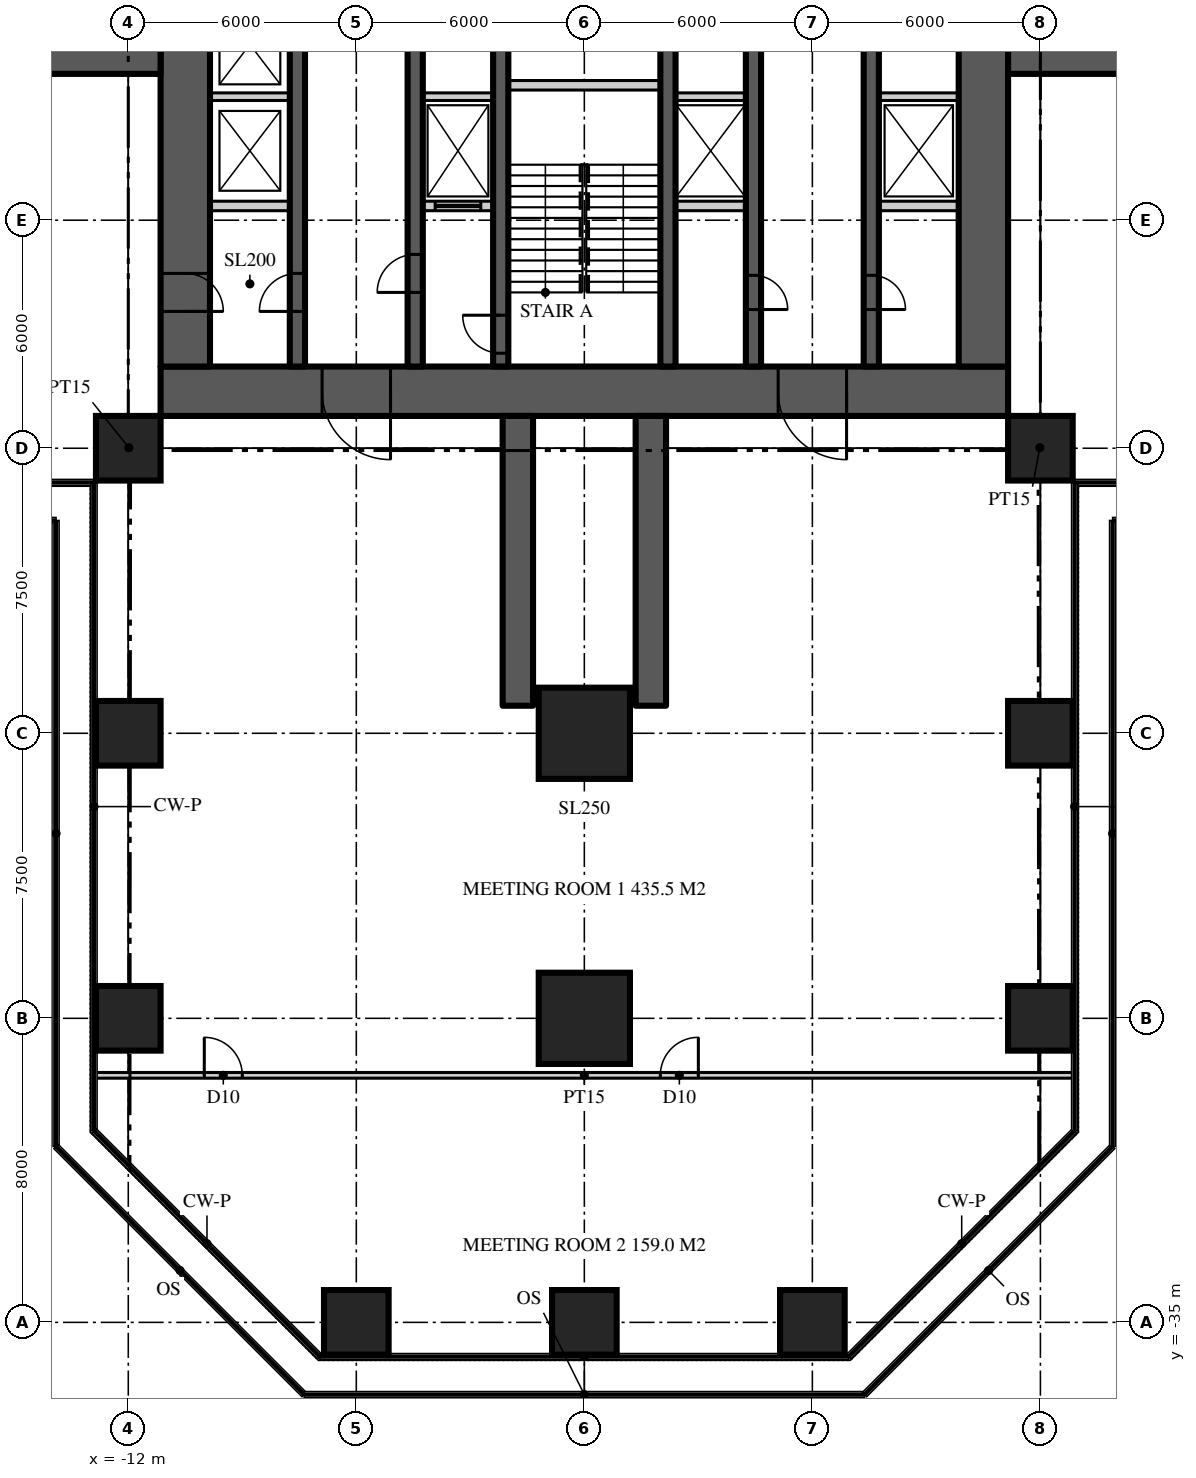
"""IFC4 building model, lengths in metres.
Left out: names, types, materials, properties, quantities, classifications, styles, units other than length and angle.
Written with IfcOpenShell. Run it as: python <this file> out.ifc"""

import sys

from ifc_helpers import new_model, si_unit, direction, frame, frame_2d, origin, origin_2d, place, context, subcontext, project, spatial, rectangle, extrude, element, fill, save


model = new_model("IFC4")
c1 = context("Model", 3, precision=1e-05, world=origin(), true_north=direction((0.0, 1.0)))
c2 = subcontext(c1, "Body", "Model", "MODEL_VIEW")
j1 = project(units=[si_unit("LENGTHUNIT", "METRE"), si_unit("PLANEANGLEUNIT", "RADIAN")], contexts=[c1])
p1 = place(None, origin())
s1 = spatial("IfcSite", under=j1, at=p1, CompositionType="ELEMENT")
p2 = place(p1, origin())
s2 = spatial("IfcBuilding", under=s1, at=p2, CompositionType="ELEMENT")
p3 = place(p2, frame((0.0, 0.0, 33.0)))
s3 = spatial("IfcBuildingStorey", under=s2, at=p3, CompositionType="ELEMENT", Elevation=33.0)
p4 = place(p3, frame((11.15, -10.5, 0.0), z_axis=(0.0, 0.0, 1.0), x_axis=(-1.0, 0.0, 0.0)))
e1 = element("IfcWall", 1, at=p4, inside=s3, PredefinedType="SHEAR", context=c2, shape_type="SweptSolid", body=[
    extrude(rectangle(XDim=22.3, YDim=1.3, at=frame_2d((11.15, 0.0))), origin(), (0.0, 0.0, 1.0), 4.5),
])
p5 = place(p4, frame((16.25, 0.0, 0.0)))
e2 = element("IfcOpeningElement", 2, at=p5, cuts=e1, PredefinedType="OPENING", context=c2, shape_type="SweptSolid", body=[
    extrude(rectangle(XDim=1.8, YDim=2.2, at=frame_2d((0.9, 1.1))), frame((0.0, 0.66, 0.0), z_axis=(0.0, -1.0, 0.0), x_axis=(1.0, 0.0, 0.0)), (0.0, 0.0, 1.0), 1.32),
])
p6 = place(p4, frame((4.25, 0.0, 0.0)))
e3 = element("IfcOpeningElement", 3, at=p6, cuts=e1, PredefinedType="OPENING", context=c2, shape_type="SweptSolid", body=[
    extrude(rectangle(XDim=1.8, YDim=2.2, at=frame_2d((0.9, 1.1))), frame((0.0, 0.66, 0.0), z_axis=(0.0, -1.0, 0.0), x_axis=(1.0, 0.0, 0.0)), (0.0, 0.0, 1.0), 1.32),
])
p7 = place(p3, frame((10.5, -9.85, 0.0), z_axis=(0.0, 0.0, 1.0), x_axis=(0.0, 1.0, 0.0)))
e4 = element("IfcWall", 4, at=p7, inside=s3, PredefinedType="SHEAR", context=c2, shape_type="SweptSolid", body=[
    extrude(rectangle(XDim=19.7, YDim=1.3, at=frame_2d((9.85, 0.0))), origin(), (0.0, 0.0, 1.0), 4.5),
])
p8 = place(p7, frame((17.25, 0.0, 0.0)))
e5 = element("IfcOpeningElement", 5, at=p8, cuts=e4, PredefinedType="OPENING", context=c2, shape_type="SweptSolid", body=[
    extrude(rectangle(XDim=1.0, YDim=2.2, at=frame_2d((0.5, 1.1))), frame((0.0, 0.66, 0.0), z_axis=(0.0, -1.0, 0.0), x_axis=(1.0, 0.0, 0.0)), (0.0, 0.0, 1.0), 1.32),
])
p9 = place(p3, frame((-10.5, 9.85, 0.0), z_axis=(0.0, 0.0, 1.0), x_axis=(0.0, -1.0, 0.0)))
e6 = element("IfcWall", 6, at=p9, inside=s3, PredefinedType="SHEAR", context=c2, shape_type="SweptSolid", body=[
    extrude(rectangle(XDim=19.7, YDim=1.3, at=frame_2d((9.85, 0.0))), origin(), (0.0, 0.0, 1.0), 4.5),
])
p10 = place(p9, frame((17.25, 0.0, 0.0)))
e7 = element("IfcOpeningElement", 7, at=p10, cuts=e6, PredefinedType="OPENING", context=c2, shape_type="SweptSolid", body=[
    extrude(rectangle(XDim=1.0, YDim=2.2, at=frame_2d((0.5, 1.1))), frame((0.0, 0.66, 0.0), z_axis=(0.0, -1.0, 0.0), x_axis=(1.0, 0.0, 0.0)), (0.0, 0.0, 1.0), 1.32),
])
for number, where, z_axis, x_axis in (
    (8, (11.15, -1.75, 0.0), (0.0, 0.0, 1.0), (1.0, 0.0, 0.0)),
    (9, (-11.15, -1.75, 0.0), (0.0, 0.0, 1.0), (-1.0, 0.0, 0.0)),
    (10, (-1.75, -11.15, 0.0), (0.0, 0.0, 1.0), (0.0, -1.0, 0.0)),
    (11, (1.75, -11.15, 0.0), (0.0, 0.0, 1.0), (0.0, -1.0, 0.0)),
):
    element("IfcWall", number, at=place(p3, frame(where, z_axis=z_axis, x_axis=x_axis)), inside=s3, PredefinedType="SHEAR", context=c2, shape_type="SweptSolid", body=[
        extrude(rectangle(XDim=7.625, YDim=0.8, at=frame_2d((3.812, 0.0))), origin(), (0.0, 0.0, 1.0), 4.5),
    ])
for number, where, z_axis, x_axis in (
    (12, (-6.0, -35.0, 0.0), (0.0, 0.0, 1.0), (1.0, 0.0, 0.0)),
    (13, (0.0, -35.0, 0.0), (0.0, 0.0, 1.0), (1.0, 0.0, 0.0)),
    (14, (6.0, -35.0, 0.0), (0.0, 0.0, 1.0), (1.0, 0.0, 0.0)),
    (15, (-12.0, -27.0, 0.0), (0.0, 0.0, 1.0), (1.0, 0.0, 0.0)),
):
    element("IfcColumn", number, at=place(p3, frame(where, z_axis=z_axis, x_axis=x_axis)), inside=s3, PredefinedType="COLUMN", context=c2, shape_type="SweptSolid", body=[
        extrude(rectangle(XDim=1.7, YDim=1.7, at=origin_2d()), origin(), (0.0, 0.0, 1.0), 4.5),
    ])
p11 = place(p3, frame((0.0, -27.0, 0.0), z_axis=(0.0, 0.0, 1.0), x_axis=(1.0, 0.0, 0.0)))
e16 = element("IfcColumn", 16, at=p11, inside=s3, PredefinedType="COLUMN", context=c2, shape_type="SweptSolid", body=[
    extrude(rectangle(XDim=2.4, YDim=2.4, at=origin_2d()), origin(), (0.0, 0.0, 1.0), 4.5),
])
for number, where, z_axis, x_axis in (
    (17, (12.0, -27.0, 0.0), (0.0, 0.0, 1.0), (1.0, 0.0, 0.0)),
    (18, (-12.0, -19.5, 0.0), (0.0, 0.0, 1.0), (1.0, 0.0, 0.0)),
):
    element("IfcColumn", number, at=place(p3, frame(where, z_axis=z_axis, x_axis=x_axis)), inside=s3, PredefinedType="COLUMN", context=c2, shape_type="SweptSolid", body=[
        extrude(rectangle(XDim=1.7, YDim=1.7, at=origin_2d()), origin(), (0.0, 0.0, 1.0), 4.5),
    ])
p12 = place(p3, frame((0.0, -19.5, 0.0), z_axis=(0.0, 0.0, 1.0), x_axis=(1.0, 0.0, 0.0)))
e19 = element("IfcColumn", 19, at=p12, inside=s3, PredefinedType="COLUMN", context=c2, shape_type="SweptSolid", body=[
    extrude(rectangle(XDim=2.4, YDim=2.4, at=origin_2d()), origin(), (0.0, 0.0, 1.0), 4.5),
])
for number, where, z_axis, x_axis in (
    (20, (12.0, -19.5, 0.0), (0.0, 0.0, 1.0), (1.0, 0.0, 0.0)),
    (21, (-12.0, -12.0, 0.0), (0.0, 0.0, 1.0), (1.0, 0.0, 0.0)),
    (22, (12.0, -12.0, 0.0), (0.0, 0.0, 1.0), (1.0, 0.0, 0.0)),
):
    element("IfcColumn", number, at=place(p3, frame(where, z_axis=z_axis, x_axis=x_axis)), inside=s3, PredefinedType="COLUMN", context=c2, shape_type="SweptSolid", body=[
        extrude(rectangle(XDim=1.7, YDim=1.7, at=origin_2d()), origin(), (0.0, 0.0, 1.0), 4.5),
    ])
p13 = place(p3, frame((-7.55, -9.85, 0.0), z_axis=(0.0, 0.0, 1.0), x_axis=(0.0, 1.0, 0.0)))
e23 = element("IfcWall", 23, at=p13, inside=s3, PredefinedType="SHEAR", context=c2, shape_type="SweptSolid", body=[
    extrude(rectangle(XDim=19.7, YDim=0.4, at=frame_2d((9.85, 0.0))), origin(), (0.0, 0.0, 1.0), 4.5),
])
p14 = place(p13, frame((1.45, 0.0, 0.0)))
e24 = element("IfcOpeningElement", 24, at=p14, cuts=e23, PredefinedType="OPENING", context=c2, shape_type="SweptSolid", body=[
    extrude(rectangle(XDim=1.0, YDim=2.2, at=frame_2d((0.5, 1.1))), frame((0.0, 0.21, 0.0), z_axis=(0.0, -1.0, 0.0), x_axis=(1.0, 0.0, 0.0)), (0.0, 0.0, 1.0), 0.42),
])
p15 = place(p13, frame((17.3, 0.0, 0.0)))
e25 = element("IfcOpeningElement", 25, at=p15, cuts=e23, PredefinedType="OPENING", context=c2, shape_type="SweptSolid", body=[
    extrude(rectangle(XDim=0.9, YDim=2.1, at=frame_2d((0.45, 1.05))), frame((0.0, 0.21, 0.0), z_axis=(0.0, -1.0, 0.0), x_axis=(1.0, 0.0, 0.0)), (0.0, 0.0, 1.0), 0.42),
])
p16 = place(p3, frame((7.55, 9.85, 0.0), z_axis=(0.0, 0.0, 1.0), x_axis=(0.0, -1.0, 0.0)))
e26 = element("IfcWall", 26, at=p16, inside=s3, PredefinedType="SHEAR", context=c2, shape_type="SweptSolid", body=[
    extrude(rectangle(XDim=19.7, YDim=0.4, at=frame_2d((9.85, 0.0))), origin(), (0.0, 0.0, 1.0), 4.5),
])
p17 = place(p16, frame((1.45, 0.0, 0.0)))
e27 = element("IfcOpeningElement", 27, at=p17, cuts=e26, PredefinedType="OPENING", context=c2, shape_type="SweptSolid", body=[
    extrude(rectangle(XDim=1.0, YDim=2.2, at=frame_2d((0.5, 1.1))), frame((0.0, 0.21, 0.0), z_axis=(0.0, -1.0, 0.0), x_axis=(1.0, 0.0, 0.0)), (0.0, 0.0, 1.0), 0.42),
])
p18 = place(p16, frame((17.3, 0.0, 0.0)))
e28 = element("IfcOpeningElement", 28, at=p18, cuts=e26, PredefinedType="OPENING", context=c2, shape_type="SweptSolid", body=[
    extrude(rectangle(XDim=0.9, YDim=2.1, at=frame_2d((0.45, 1.05))), frame((0.0, 0.21, 0.0), z_axis=(0.0, -1.0, 0.0), x_axis=(1.0, 0.0, 0.0)), (0.0, 0.0, 1.0), 0.42),
])
p19 = place(p3, frame((-4.45, -9.85, 0.0), z_axis=(0.0, 0.0, 1.0), x_axis=(0.0, 1.0, 0.0)))
e29 = element("IfcWall", 29, at=p19, inside=s3, PredefinedType="SHEAR", context=c2, shape_type="SweptSolid", body=[
    extrude(rectangle(XDim=19.7, YDim=0.4, at=frame_2d((9.85, 0.0))), origin(), (0.0, 0.0, 1.0), 4.5),
])
p20 = place(p19, frame((1.95, 0.0, 0.0)))
e30 = element("IfcOpeningElement", 30, at=p20, cuts=e29, PredefinedType="OPENING", context=c2, shape_type="SweptSolid", body=[
    extrude(rectangle(XDim=1.0, YDim=2.2, at=frame_2d((0.5, 1.1))), frame((0.0, 0.21, 0.0), z_axis=(0.0, -1.0, 0.0), x_axis=(1.0, 0.0, 0.0)), (0.0, 0.0, 1.0), 0.42),
])
p21 = place(p19, frame((17.25, 0.0, 0.0)))
e31 = element("IfcOpeningElement", 31, at=p21, cuts=e29, PredefinedType="OPENING", context=c2, shape_type="SweptSolid", body=[
    extrude(rectangle(XDim=1.0, YDim=2.1, at=frame_2d((0.5, 1.05))), frame((0.0, 0.21, 0.0), z_axis=(0.0, -1.0, 0.0), x_axis=(1.0, 0.0, 0.0)), (0.0, 0.0, 1.0), 0.42),
])
p22 = place(p3, frame((4.45, 9.85, 0.0), z_axis=(0.0, 0.0, 1.0), x_axis=(0.0, -1.0, 0.0)))
e32 = element("IfcWall", 32, at=p22, inside=s3, PredefinedType="SHEAR", context=c2, shape_type="SweptSolid", body=[
    extrude(rectangle(XDim=19.7, YDim=0.4, at=frame_2d((9.85, 0.0))), origin(), (0.0, 0.0, 1.0), 4.5),
])
p23 = place(p22, frame((1.95, 0.0, 0.0)))
e33 = element("IfcOpeningElement", 33, at=p23, cuts=e32, PredefinedType="OPENING", context=c2, shape_type="SweptSolid", body=[
    extrude(rectangle(XDim=1.0, YDim=2.2, at=frame_2d((0.5, 1.1))), frame((0.0, 0.21, 0.0), z_axis=(0.0, -1.0, 0.0), x_axis=(1.0, 0.0, 0.0)), (0.0, 0.0, 1.0), 0.42),
])
p24 = place(p22, frame((17.3, 0.0, 0.0)))
e34 = element("IfcOpeningElement", 34, at=p24, cuts=e32, PredefinedType="OPENING", context=c2, shape_type="SweptSolid", body=[
    extrude(rectangle(XDim=0.9, YDim=2.1, at=frame_2d((0.45, 1.05))), frame((0.0, 0.21, 0.0), z_axis=(0.0, -1.0, 0.0), x_axis=(1.0, 0.0, 0.0)), (0.0, 0.0, 1.0), 0.42),
])
p25 = place(p3, frame((-2.2, -9.85, 0.0), z_axis=(0.0, 0.0, 1.0), x_axis=(0.0, 1.0, 0.0)))
e35 = element("IfcWall", 35, at=p25, inside=s3, PredefinedType="SHEAR", context=c2, shape_type="SweptSolid", body=[
    extrude(rectangle(XDim=19.7, YDim=0.4, at=frame_2d((9.85, 0.0))), origin(), (0.0, 0.0, 1.0), 4.5),
])
p26 = place(p25, frame((0.35, 0.0, 0.0)))
e36 = element("IfcOpeningElement", 36, at=p26, cuts=e35, PredefinedType="OPENING", context=c2, shape_type="SweptSolid", body=[
    extrude(rectangle(XDim=1.0, YDim=2.2, at=frame_2d((0.5, 1.1))), frame((0.0, 0.21, 0.0), z_axis=(0.0, -1.0, 0.0), x_axis=(1.0, 0.0, 0.0)), (0.0, 0.0, 1.0), 0.42),
])
p27 = place(p3, frame((2.2, 9.85, 0.0), z_axis=(0.0, 0.0, 1.0), x_axis=(0.0, -1.0, 0.0)))
e37 = element("IfcWall", 37, at=p27, inside=s3, PredefinedType="SHEAR", context=c2, shape_type="SweptSolid", body=[
    extrude(rectangle(XDim=19.7, YDim=0.4, at=frame_2d((9.85, 0.0))), origin(), (0.0, 0.0, 1.0), 4.5),
])
p28 = place(p27, frame((0.35, 0.0, 0.0)))
e38 = element("IfcOpeningElement", 38, at=p28, cuts=e37, PredefinedType="OPENING", context=c2, shape_type="SweptSolid", body=[
    extrude(rectangle(XDim=1.0, YDim=2.2, at=frame_2d((0.5, 1.1))), frame((0.0, 0.21, 0.0), z_axis=(0.0, -1.0, 0.0), x_axis=(1.0, 0.0, 0.0)), (0.0, 0.0, 1.0), 0.42),
])
p29 = place(p3, frame((-9.85, -5.625, 0.0), z_axis=(0.0, 0.0, 1.0), x_axis=(1.0, 0.0, 0.0)))
e39 = element("IfcWall", 39, at=p29, inside=s3, PredefinedType="SOLIDWALL", context=c2, shape_type="SweptSolid", body=[
    extrude(rectangle(XDim=2.1, YDim=0.25, at=frame_2d((1.05, 0.0))), origin(), (0.0, 0.0, 1.0), 4.3),
])
p30 = place(p3, frame((-4.25, -5.625, 0.0), z_axis=(0.0, 0.0, 1.0), x_axis=(1.0, 0.0, 0.0)))
e40 = element("IfcWall", 40, at=p30, inside=s3, PredefinedType="SOLIDWALL", context=c2, shape_type="SweptSolid", body=[
    extrude(rectangle(XDim=1.85, YDim=0.25, at=frame_2d((0.925, 0.0))), origin(), (0.0, 0.0, 1.0), 4.3),
])
p31 = place(p30, frame((0.325, 0.0, 0.0)))
e41 = element("IfcOpeningElement", 41, at=p31, cuts=e40, PredefinedType="OPENING", context=c2, shape_type="SweptSolid", body=[
    extrude(rectangle(XDim=1.2, YDim=2.2, at=frame_2d((0.6, 1.1))), frame((0.0, 0.135, 0.0), z_axis=(0.0, -1.0, 0.0), x_axis=(1.0, 0.0, 0.0)), (0.0, 0.0, 1.0), 0.27),
])
p32 = place(p3, frame((2.4, -5.625, 0.0), z_axis=(0.0, 0.0, 1.0), x_axis=(1.0, 0.0, 0.0)))
e42 = element("IfcWall", 42, at=p32, inside=s3, PredefinedType="SOLIDWALL", context=c2, shape_type="SweptSolid", body=[
    extrude(rectangle(XDim=1.85, YDim=0.25, at=frame_2d((0.925, 0.0))), origin(), (0.0, 0.0, 1.0), 4.3),
])
p33 = place(p3, frame((7.75, -5.625, 0.0), z_axis=(0.0, 0.0, 1.0), x_axis=(1.0, 0.0, 0.0)))
e43 = element("IfcWall", 43, at=p33, inside=s3, PredefinedType="SOLIDWALL", context=c2, shape_type="SweptSolid", body=[
    extrude(rectangle(XDim=2.1, YDim=0.25, at=frame_2d((1.05, 0.0))), origin(), (0.0, 0.0, 1.0), 4.3),
])
p34 = place(p3, frame((-2.0, -2.45, 0.0), z_axis=(0.0, 0.0, 1.0), x_axis=(1.0, 0.0, 0.0)))
e44 = element("IfcWall", 44, at=p34, inside=s3, PredefinedType="SOLIDWALL", context=c2, shape_type="SweptSolid", body=[
    extrude(rectangle(XDim=4.0, YDim=0.25, at=frame_2d((2.0, 0.0))), origin(), (0.0, 0.0, 1.0), 4.3),
])
p35 = place(p3, frame((-9.85, -2.75, 0.0), z_axis=(0.0, 0.0, 1.0), x_axis=(1.0, 0.0, 0.0)))
e45 = element("IfcWall", 45, at=p35, inside=s3, PredefinedType="SOLIDWALL", context=c2, shape_type="SweptSolid", body=[
    extrude(rectangle(XDim=2.1, YDim=0.2, at=frame_2d((1.05, 0.0))), origin(), (0.0, 0.0, 1.0), 4.3),
])
for number, where, z_axis, x_axis in (
    (46, (-4.25, -2.75, 0.0), (0.0, 0.0, 1.0), (1.0, 0.0, 0.0)),
    (47, (2.4, -2.75, 0.0), (0.0, 0.0, 1.0), (1.0, 0.0, 0.0)),
):
    element("IfcWall", number, at=place(p3, frame(where, z_axis=z_axis, x_axis=x_axis)), inside=s3, PredefinedType="SOLIDWALL", context=c2, shape_type="SweptSolid", body=[
        extrude(rectangle(XDim=1.85, YDim=0.2, at=frame_2d((0.925, 0.0))), origin(), (0.0, 0.0, 1.0), 4.3),
    ])
p36 = place(p3, frame((7.75, -2.75, 0.0), z_axis=(0.0, 0.0, 1.0), x_axis=(1.0, 0.0, 0.0)))
e48 = element("IfcWall", 48, at=p36, inside=s3, PredefinedType="SOLIDWALL", context=c2, shape_type="SweptSolid", body=[
    extrude(rectangle(XDim=2.1, YDim=0.2, at=frame_2d((1.05, 0.0))), origin(), (0.0, 0.0, 1.0), 4.3),
])
p37 = place(p3, frame((-12.875, -28.5, 0.0), z_axis=(0.0, 0.0, 1.0), x_axis=(1.0, 0.0, 0.0)))
e49 = element("IfcWall", 49, at=p37, inside=s3, PredefinedType="PARTITIONING", context=c2, shape_type="SweptSolid", body=[
    extrude(rectangle(XDim=25.75, YDim=0.15, at=frame_2d((12.875, 0.0))), origin(), (0.0, 0.0, 1.0), 4.25),
])
p38 = place(p37, frame((14.875, 0.0, 0.0)))
e50 = element("IfcOpeningElement", 50, at=p38, cuts=e49, PredefinedType="OPENING", context=c2, shape_type="SweptSolid", body=[
    extrude(rectangle(XDim=1.0, YDim=2.2, at=frame_2d((0.5, 1.1))), frame((0.0, 0.085, 0.0), z_axis=(0.0, -1.0, 0.0), x_axis=(1.0, 0.0, 0.0)), (0.0, 0.0, 1.0), 0.17),
])
p39 = place(p37, frame((2.875, 0.0, 0.0)))
e51 = element("IfcOpeningElement", 51, at=p39, cuts=e49, PredefinedType="OPENING", context=c2, shape_type="SweptSolid", body=[
    extrude(rectangle(XDim=1.0, YDim=2.2, at=frame_2d((0.5, 1.1))), frame((0.0, 0.085, 0.0), z_axis=(0.0, -1.0, 0.0), x_axis=(1.0, 0.0, 0.0)), (0.0, 0.0, 1.0), 0.17),
])
for number, where, z_axis, x_axis in (
    (52, (-11.15, -11.15, 0.0), (0.0, 0.0, 1.0), (-0.707, -0.707, 0.0)),
    (53, (11.15, -11.15, 0.0), (0.0, 0.0, 1.0), (0.707, -0.707, 0.0)),
):
    element("IfcWall", number, at=place(p3, frame(where, z_axis=z_axis, x_axis=x_axis)), inside=s3, PredefinedType="PARTITIONING", context=c2, shape_type="SweptSolid", body=[
        extrude(rectangle(XDim=2.362, YDim=0.15, at=frame_2d((1.181, 0.0))), origin(), (0.0, 0.0, 1.0), 4.25),
    ])
p40 = place(p5, origin())
e54 = element("IfcDoor", 54, at=p40, inside=s3, OperationType="DOUBLE_DOOR_DOUBLE_SWING", PredefinedType="DOOR", context=c2, shape_type="SweptSolid", body=[
    extrude(rectangle(XDim=1.8, YDim=2.2, at=frame_2d((0.9, 1.1))), frame((0.0, 0.025, 0.0), z_axis=(0.0, -1.0, 0.0), x_axis=(1.0, 0.0, 0.0)), (0.0, 0.0, 1.0), 0.05),
])
fill(e2, e54)
p41 = place(p6, origin())
e55 = element("IfcDoor", 55, at=p41, inside=s3, OperationType="DOUBLE_DOOR_DOUBLE_SWING", PredefinedType="DOOR", context=c2, shape_type="SweptSolid", body=[
    extrude(rectangle(XDim=1.8, YDim=2.2, at=frame_2d((0.9, 1.1))), frame((0.0, 0.025, 0.0), z_axis=(0.0, -1.0, 0.0), x_axis=(1.0, 0.0, 0.0)), (0.0, 0.0, 1.0), 0.05),
])
fill(e3, e55)
p42 = place(p14, origin())
e56 = element("IfcDoor", 56, at=p42, inside=s3, OperationType="SINGLE_SWING_LEFT", PredefinedType="DOOR", context=c2, shape_type="SweptSolid", body=[
    extrude(rectangle(XDim=1.0, YDim=2.2, at=frame_2d((0.5, 1.1))), frame((0.0, 0.025, 0.0), z_axis=(0.0, -1.0, 0.0), x_axis=(1.0, 0.0, 0.0)), (0.0, 0.0, 1.0), 0.05),
])
fill(e24, e56)
p43 = place(p10, origin())
e57 = element("IfcDoor", 57, at=p43, inside=s3, OperationType="SINGLE_SWING_RIGHT", PredefinedType="DOOR", context=c2, shape_type="SweptSolid", body=[
    extrude(rectangle(XDim=1.0, YDim=2.2, at=frame_2d((0.5, 1.1))), frame((0.0, 0.025, 0.0), z_axis=(0.0, -1.0, 0.0), x_axis=(1.0, 0.0, 0.0)), (0.0, 0.0, 1.0), 0.05),
])
fill(e7, e57)
p44 = place(p20, origin())
e58 = element("IfcDoor", 58, at=p44, inside=s3, OperationType="SINGLE_SWING_LEFT", PredefinedType="DOOR", context=c2, shape_type="SweptSolid", body=[
    extrude(rectangle(XDim=1.0, YDim=2.2, at=frame_2d((0.5, 1.1))), frame((0.0, 0.025, 0.0), z_axis=(0.0, -1.0, 0.0), x_axis=(1.0, 0.0, 0.0)), (0.0, 0.0, 1.0), 0.05),
])
fill(e30, e58)
p45 = place(p26, origin())
e59 = element("IfcDoor", 59, at=p45, inside=s3, OperationType="SINGLE_SWING_RIGHT", PredefinedType="DOOR", context=c2, shape_type="SweptSolid", body=[
    extrude(rectangle(XDim=1.0, YDim=2.2, at=frame_2d((0.5, 1.1))), frame((0.0, 0.025, 0.0), z_axis=(0.0, -1.0, 0.0), x_axis=(1.0, 0.0, 0.0)), (0.0, 0.0, 1.0), 0.05),
])
fill(e36, e59)
p46 = place(p18, origin())
e60 = element("IfcDoor", 60, at=p46, inside=s3, OperationType="SINGLE_SWING_RIGHT", PredefinedType="DOOR", context=c2, shape_type="SweptSolid", body=[
    extrude(rectangle(XDim=0.9, YDim=2.1, at=frame_2d((0.45, 1.05))), frame((0.0, 0.025, 0.0), z_axis=(0.0, -1.0, 0.0), x_axis=(1.0, 0.0, 0.0)), (0.0, 0.0, 1.0), 0.05),
])
fill(e28, e60)
p47 = place(p24, origin())
e61 = element("IfcDoor", 61, at=p47, inside=s3, OperationType="SINGLE_SWING_RIGHT", PredefinedType="DOOR", context=c2, shape_type="SweptSolid", body=[
    extrude(rectangle(XDim=0.9, YDim=2.1, at=frame_2d((0.45, 1.05))), frame((0.0, 0.025, 0.0), z_axis=(0.0, -1.0, 0.0), x_axis=(1.0, 0.0, 0.0)), (0.0, 0.0, 1.0), 0.05),
])
fill(e34, e61)
p48 = place(p31, origin())
e62 = element("IfcDoor", 62, at=p48, inside=s3, OperationType="SLIDING_TO_LEFT", PredefinedType="DOOR", context=c2, shape_type="SweptSolid", body=[
    extrude(rectangle(XDim=1.2, YDim=2.2, at=frame_2d((0.6, 1.1))), frame((0.0, 0.025, 0.0), z_axis=(0.0, -1.0, 0.0), x_axis=(1.0, 0.0, 0.0)), (0.0, 0.0, 1.0), 0.05),
])
fill(e41, e62)
p49 = place(p38, origin())
e63 = element("IfcDoor", 63, at=p49, inside=s3, OperationType="SINGLE_SWING_RIGHT", PredefinedType="DOOR", context=c2, shape_type="SweptSolid", body=[
    extrude(rectangle(XDim=1.0, YDim=2.2, at=frame_2d((0.5, 1.1))), frame((0.0, 0.025, 0.0), z_axis=(0.0, -1.0, 0.0), x_axis=(1.0, 0.0, 0.0)), (0.0, 0.0, 1.0), 0.05),
])
fill(e50, e63)
p50 = place(p39, origin())
e64 = element("IfcDoor", 64, at=p50, inside=s3, OperationType="SINGLE_SWING_LEFT", PredefinedType="DOOR", context=c2, shape_type="SweptSolid", body=[
    extrude(rectangle(XDim=1.0, YDim=2.2, at=frame_2d((0.5, 1.1))), frame((0.0, 0.025, 0.0), z_axis=(0.0, -1.0, 0.0), x_axis=(1.0, 0.0, 0.0)), (0.0, 0.0, 1.0), 0.05),
])
fill(e51, e64)
save(model, sys.argv[1])
